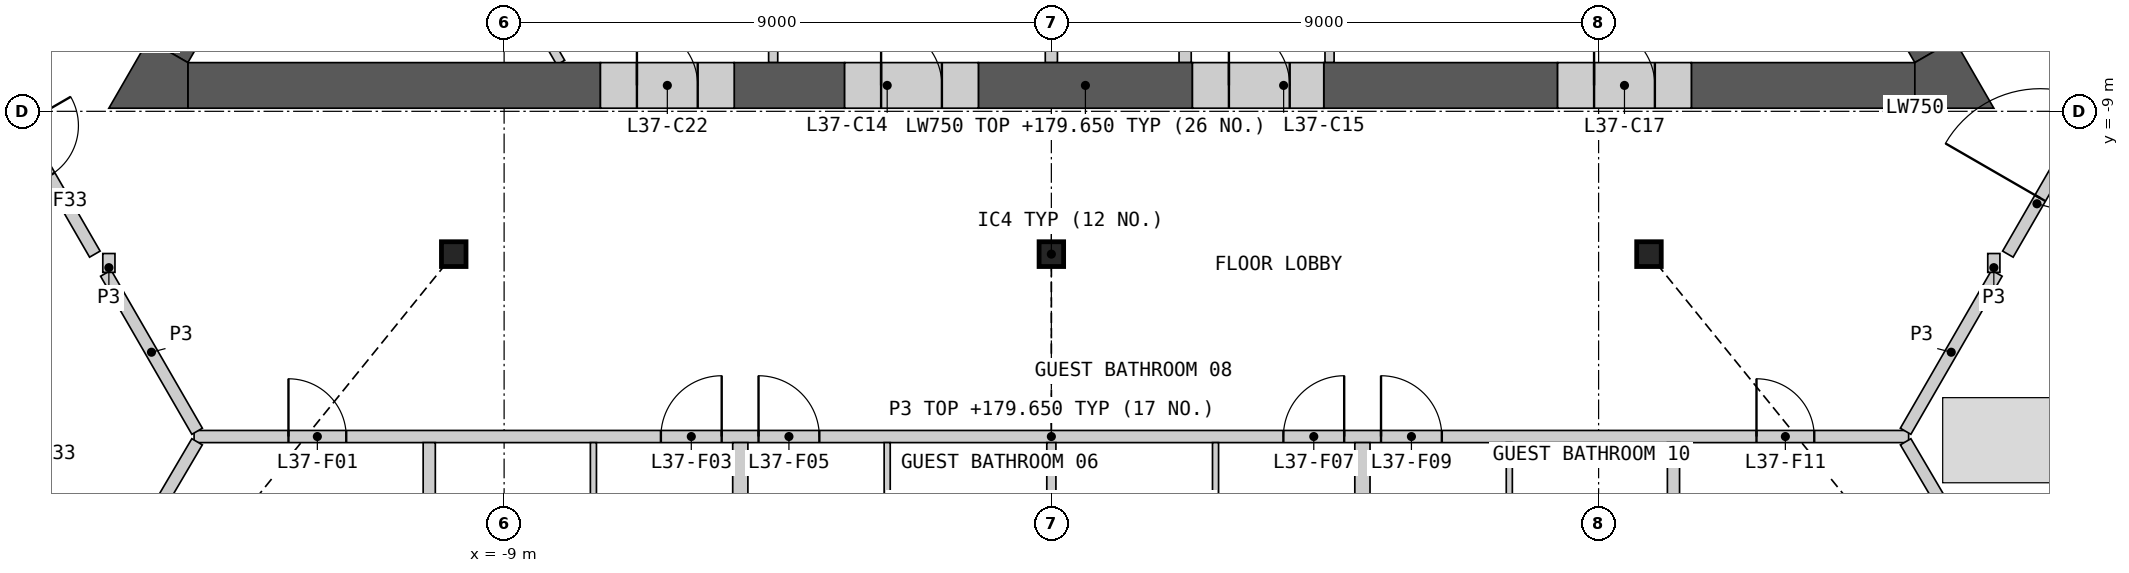
"""IFC4 building model, lengths in metres.
Left out: names, types, materials, properties, quantities, classifications, styles, units other than length and angle.
Written with IfcOpenShell. Run it as: python <this file> out.ifc"""

import sys

from ifc_helpers import new_model, si_unit, direction, frame, frame_2d, origin, origin_2d, place, context, subcontext, project, spatial, polyline, rectangle, i_section, outline, extrude, element, fill, save


model = new_model("IFC4")
c1 = context("Model", 3, precision=1e-05, world=origin(), true_north=direction((0.0, 1.0)))
c2 = subcontext(c1, "Body", "Model", "MODEL_VIEW")
j1 = project(units=[si_unit("LENGTHUNIT", "METRE"), si_unit("PLANEANGLEUNIT", "RADIAN")], contexts=[c1])
p1 = place(None, origin())
s1 = spatial("IfcSite", under=j1, at=p1, CompositionType="ELEMENT")
p2 = place(p1, origin())
s2 = spatial("IfcBuilding", under=s1, at=p2, CompositionType="ELEMENT")
p3 = place(p2, frame((0.0, 0.0, 176.4)))
s3 = spatial("IfcBuildingStorey", under=s2, at=p3, CompositionType="ELEMENT", Elevation=176.4)
for number, where, z_axis, x_axis in (
    (1, (-9.828, -11.349, 0.0), (0.0, 0.0, 1.0), (1.0, 0.0, 0.0)),
    (2, (0.0, -11.349, 0.0), (0.0, 0.0, 1.0), (1.0, 0.0, 0.0)),
    (3, (9.828, -11.349, 0.0), (0.0, 0.0, 1.0), (1.0, 0.0, 0.0)),
):
    element("IfcColumn", number, at=place(p3, frame(where, z_axis=z_axis, x_axis=x_axis)), inside=s3, PredefinedType="COLUMN", context=c2, shape_type="SweptSolid", body=[
        extrude(i_section(OverallWidth=0.404, OverallDepth=0.407, WebThickness=0.027, FlangeThickness=0.044, at=origin_2d()), origin(), (0.0, 0.0, 1.0), 3.6),
    ])
for number, where, z_axis, x_axis in (
    (4, (0.0, -6.906, 0.0), (0.0, 0.0, 1.0), (0.0, -1.0, 0.0)),
    (5, (2.2, -6.906, 0.0), (0.0, 0.0, 1.0), (0.0, -1.0, 0.0)),
):
    element("IfcWall", number, at=place(p3, frame(where, z_axis=z_axis, x_axis=x_axis)), inside=s3, PredefinedType="SHEAR", context=c2, shape_type="SweptSolid", body=[
        extrude(rectangle(XDim=1.293, YDim=0.2, at=frame_2d((0.646, 0.0))), origin(), (0.0, 0.0, 1.0), 3.25),
    ])
for number, where, z_axis, x_axis in (
    (6, (4.575, -6.906, 0.0), (0.0, 0.0, 1.0), (0.0, -1.0, 0.0)),
    (7, (-4.575, -6.906, 0.0), (0.0, 0.0, 1.0), (0.0, -1.0, 0.0)),
):
    element("IfcWall", number, at=place(p3, frame(where, z_axis=z_axis, x_axis=x_axis)), inside=s3, PredefinedType="PARTITIONING", context=c2, shape_type="SweptSolid", body=[
        extrude(rectangle(XDim=1.293, YDim=0.15, at=frame_2d((0.646, 0.0))), origin(), (0.0, 0.0, 1.0), 3.25),
    ])
p4 = place(p3, frame((-8.83, -6.881, 0.0), z_axis=(0.0, 0.0, 1.0), x_axis=(0.500037110984, -0.866003976688, 0.0)))
e8 = element("IfcWall", 8, at=p4, inside=s3, PredefinedType="PARTITIONING", context=c2, shape_type="SweptSolid", body=[
    extrude(rectangle(XDim=1.522, YDim=0.15, at=frame_2d((0.761, 0.0))), origin(), (0.0, 0.0, 1.0), 3.25),
])
p5 = place(p3, frame((-14.201, -8.574, 0.0), z_axis=(0.0, 0.0, 1.0), x_axis=(1.0, 0.0, 0.0)))
e9 = element("IfcWall", 9, at=p5, inside=s3, PredefinedType="SHEAR", context=c2, shape_type="SweptSolid", body=[
    extrude(rectangle(XDim=6.785, YDim=0.75, at=frame_2d((3.393, 0.0))), origin(), (0.0, 0.0, 1.0), 3.25),
])
p6 = place(p3, frame((4.48, -8.574, 0.0), z_axis=(0.0, 0.0, 1.0), x_axis=(1.0, 0.0, 0.0)))
e10 = element("IfcWall", 10, at=p6, inside=s3, PredefinedType="SHEAR", context=c2, shape_type="SweptSolid", body=[
    extrude(rectangle(XDim=3.845, YDim=0.75, at=frame_2d((1.923, 0.0))), origin(), (0.0, 0.0, 1.0), 3.25),
])
p7 = place(p3, frame((10.525, -8.574, 0.0), z_axis=(0.0, 0.0, 1.0), x_axis=(1.0, 0.0, 0.0)))
e11 = element("IfcWall", 11, at=p7, inside=s3, PredefinedType="SHEAR", context=c2, shape_type="SweptSolid", body=[
    extrude(rectangle(XDim=3.676, YDim=0.75, at=frame_2d((1.838, 0.0))), origin(), (0.0, 0.0, 1.0), 3.25),
])
p8 = place(p3, frame((-1.2, -8.574, 0.0), z_axis=(0.0, 0.0, 1.0), x_axis=(1.0, 0.0, 0.0)))
e12 = element("IfcWall", 12, at=p8, inside=s3, PredefinedType="SHEAR", context=c2, shape_type="SweptSolid", body=[
    extrude(rectangle(XDim=3.52, YDim=0.75, at=frame_2d((1.76, 0.0))), origin(), (0.0, 0.0, 1.0), 3.25),
])
p9 = place(p3, frame((-5.216, -8.574, 0.0), z_axis=(0.0, 0.0, 1.0), x_axis=(1.0, 0.0, 0.0)))
e13 = element("IfcWall", 13, at=p9, inside=s3, PredefinedType="SHEAR", context=c2, shape_type="SweptSolid", body=[
    extrude(rectangle(XDim=1.816, YDim=0.75, at=frame_2d((0.908, 0.0))), origin(), (0.0, 0.0, 1.0), 3.25),
])
p10 = place(p3, frame((14.526, -8.011, 0.0), z_axis=(0.0, 0.0, 1.0), x_axis=(-0.499994855372, 0.866028374016, 0.0)))
e14 = element("IfcWall", 14, at=p10, inside=s3, PredefinedType="SHEAR", context=c2, shape_type="SweptSolid", body=[
    extrude(rectangle(XDim=14.301, YDim=0.75, at=frame_2d((7.15, 0.0))), origin(), (0.0, 0.0, 1.0), 3.25),
])
p11 = place(p3, frame((-13.564, -6.346, 0.0), z_axis=(0.0, 0.0, 1.0), x_axis=(-0.499989888488, -0.86603124159, 0.0)))
e15 = element("IfcWall", 15, at=p11, inside=s3, PredefinedType="SHEAR", context=c2, shape_type="SweptSolid", body=[
    extrude(rectangle(XDim=1.923, YDim=0.75, at=frame_2d((0.961, 0.0))), origin(), (0.0, 0.0, 1.0), 3.25),
])
p12 = place(p3, origin())
e16 = element("IfcWall", 16, at=p12, inside=s3, PredefinedType="SHEAR", context=c2, shape_type="SweptSolid", body=[
    extrude(outline(polyline([(14.201, -8.949), (14.201, -8.199), (14.851, -7.824), (15.5, -8.949), (14.201, -8.949)])), origin(), (0.0, 0.0, 1.0), 3.25),
])
p13 = place(p3, origin())
e17 = element("IfcWall", 17, at=p13, inside=s3, PredefinedType="SHEAR", context=c2, shape_type="SweptSolid", body=[
    extrude(outline(polyline([(-14.851, -7.824), (-14.201, -8.199), (-14.201, -8.949), (-15.5, -8.949), (-14.851, -7.824)])), origin(), (0.0, 0.0, 1.0), 3.25),
])
p14 = place(p3, frame((-3.4, -8.574, 0.0), z_axis=(0.0, 0.0, 1.0), x_axis=(1.0, 0.0, 0.0)))
e18 = element("IfcWall", 18, at=p14, inside=s3, PredefinedType="SHEAR", context=c2, shape_type="SweptSolid", body=[
    extrude(rectangle(XDim=2.2, YDim=0.75, at=frame_2d((1.1, 0.0))), origin(), (0.0, 0.0, 1.0), 3.25),
])
p15 = place(p14, frame((0.6, 0.0, 0.0)))
e19 = element("IfcOpeningElement", 19, at=p15, cuts=e18, PredefinedType="OPENING", context=c2, shape_type="SweptSolid", body=[
    extrude(rectangle(XDim=1.0, YDim=2.1, at=frame_2d((0.5, 1.05))), frame((0.0, 0.385, 0.0), z_axis=(0.0, -1.0, 0.0), x_axis=(1.0, 0.0, 0.0)), (0.0, 0.0, 1.0), 0.77),
])
p16 = place(p3, frame((2.32, -8.574, 0.0), z_axis=(0.0, 0.0, 1.0), x_axis=(1.0, 0.0, 0.0)))
e20 = element("IfcWall", 20, at=p16, inside=s3, PredefinedType="SHEAR", context=c2, shape_type="SweptSolid", body=[
    extrude(rectangle(XDim=2.16, YDim=0.75, at=frame_2d((1.08, 0.0))), origin(), (0.0, 0.0, 1.0), 3.25),
])
p17 = place(p16, frame((0.6, 0.0, 0.0)))
e21 = element("IfcOpeningElement", 21, at=p17, cuts=e20, PredefinedType="OPENING", context=c2, shape_type="SweptSolid", body=[
    extrude(rectangle(XDim=1.0, YDim=2.1, at=frame_2d((0.5, 1.05))), frame((0.0, 0.385, 0.0), z_axis=(0.0, -1.0, 0.0), x_axis=(1.0, 0.0, 0.0)), (0.0, 0.0, 1.0), 0.77),
])
p18 = place(p3, frame((8.325, -8.574, 0.0), z_axis=(0.0, 0.0, 1.0), x_axis=(1.0, 0.0, 0.0)))
e22 = element("IfcWall", 22, at=p18, inside=s3, PredefinedType="SHEAR", context=c2, shape_type="SweptSolid", body=[
    extrude(rectangle(XDim=2.2, YDim=0.75, at=frame_2d((1.1, 0.0))), origin(), (0.0, 0.0, 1.0), 3.25),
])
p19 = place(p18, frame((0.6, 0.0, 0.0)))
e23 = element("IfcOpeningElement", 23, at=p19, cuts=e22, PredefinedType="OPENING", context=c2, shape_type="SweptSolid", body=[
    extrude(rectangle(XDim=1.0, YDim=2.1, at=frame_2d((0.5, 1.05))), frame((0.0, 0.385, 0.0), z_axis=(0.0, -1.0, 0.0), x_axis=(1.0, 0.0, 0.0)), (0.0, 0.0, 1.0), 0.77),
])
p20 = place(p3, frame((-7.416, -8.574, 0.0), z_axis=(0.0, 0.0, 1.0), x_axis=(1.0, 0.0, 0.0)))
e24 = element("IfcWall", 24, at=p20, inside=s3, PredefinedType="SHEAR", context=c2, shape_type="SweptSolid", body=[
    extrude(rectangle(XDim=2.2, YDim=0.75, at=frame_2d((1.1, 0.0))), origin(), (0.0, 0.0, 1.0), 3.25),
])
p21 = place(p20, frame((0.6, 0.0, 0.0)))
e25 = element("IfcOpeningElement", 25, at=p21, cuts=e24, PredefinedType="OPENING", context=c2, shape_type="SweptSolid", body=[
    extrude(rectangle(XDim=1.0, YDim=2.1, at=frame_2d((0.5, 1.05))), frame((0.0, 0.385, 0.0), z_axis=(0.0, -1.0, 0.0), x_axis=(1.0, 0.0, 0.0)), (0.0, 0.0, 1.0), 0.77),
])
p22 = place(p3, frame((-14.099, -14.349, 0.0), z_axis=(0.0, 0.0, 1.0), x_axis=(1.0, 0.0, 0.0)))
e26 = element("IfcWall", 26, at=p22, inside=s3, PredefinedType="PARTITIONING", context=c2, shape_type="SweptSolid", body=[
    extrude(rectangle(XDim=28.198, YDim=0.2, at=frame_2d((14.099, 0.0))), origin(), (0.0, 0.0, 1.0), 3.25),
])
p23 = place(p22, frame((1.552, 0.0, 0.0)))
e27 = element("IfcOpeningElement", 27, at=p23, cuts=e26, PredefinedType="OPENING", context=c2, shape_type="SweptSolid", body=[
    extrude(rectangle(XDim=0.95, YDim=2.1, at=frame_2d((0.475, 1.05))), frame((0.0, 0.11, 0.0), z_axis=(0.0, -1.0, 0.0), x_axis=(1.0, 0.0, 0.0)), (0.0, 0.0, 1.0), 0.22),
])
p24 = place(p22, frame((7.677, 0.0, 0.0)))
e28 = element("IfcOpeningElement", 28, at=p24, cuts=e26, PredefinedType="OPENING", context=c2, shape_type="SweptSolid", body=[
    extrude(rectangle(XDim=1.0, YDim=2.1, at=frame_2d((0.5, 1.05))), frame((0.0, 0.11, 0.0), z_axis=(0.0, -1.0, 0.0), x_axis=(1.0, 0.0, 0.0)), (0.0, 0.0, 1.0), 0.22),
])
p25 = place(p22, frame((9.283, 0.0, 0.0)))
e29 = element("IfcOpeningElement", 29, at=p25, cuts=e26, PredefinedType="OPENING", context=c2, shape_type="SweptSolid", body=[
    extrude(rectangle(XDim=1.0, YDim=2.1, at=frame_2d((0.5, 1.05))), frame((0.0, 0.11, 0.0), z_axis=(0.0, -1.0, 0.0), x_axis=(1.0, 0.0, 0.0)), (0.0, 0.0, 1.0), 0.22),
])
p26 = place(p22, frame((17.915, 0.0, 0.0)))
e30 = element("IfcOpeningElement", 30, at=p26, cuts=e26, PredefinedType="OPENING", context=c2, shape_type="SweptSolid", body=[
    extrude(rectangle(XDim=1.0, YDim=2.1, at=frame_2d((0.5, 1.05))), frame((0.0, 0.11, 0.0), z_axis=(0.0, -1.0, 0.0), x_axis=(1.0, 0.0, 0.0)), (0.0, 0.0, 1.0), 0.22),
])
p27 = place(p22, frame((19.521, 0.0, 0.0)))
e31 = element("IfcOpeningElement", 31, at=p27, cuts=e26, PredefinedType="OPENING", context=c2, shape_type="SweptSolid", body=[
    extrude(rectangle(XDim=1.0, YDim=2.1, at=frame_2d((0.5, 1.05))), frame((0.0, 0.11, 0.0), z_axis=(0.0, -1.0, 0.0), x_axis=(1.0, 0.0, 0.0)), (0.0, 0.0, 1.0), 0.22),
])
p28 = place(p22, frame((25.696, 0.0, 0.0)))
e32 = element("IfcOpeningElement", 32, at=p28, cuts=e26, PredefinedType="OPENING", context=c2, shape_type="SweptSolid", body=[
    extrude(rectangle(XDim=0.95, YDim=2.1, at=frame_2d((0.475, 1.05))), frame((0.0, 0.11, 0.0), z_axis=(0.0, -1.0, 0.0), x_axis=(1.0, 0.0, 0.0)), (0.0, 0.0, 1.0), 0.22),
])
p29 = place(p3, frame((-17.744, -8.035, 0.0), z_axis=(0.0, 0.0, 1.0), x_axis=(0.500007607708, 0.866021011428, 0.0)))
e33 = element("IfcWall", 33, at=p29, inside=s3, PredefinedType="PARTITIONING", context=c2, shape_type="SweptSolid", body=[
    extrude(rectangle(XDim=5.484, YDim=0.2, at=frame_2d((2.742, 0.0))), origin(), (0.0, 0.0, 1.0), 3.25),
])
p30 = place(p29, frame((0.352, 0.0, 0.0)))
e34 = element("IfcOpeningElement", 34, at=p30, cuts=e33, PredefinedType="OPENING", context=c2, shape_type="SweptSolid", body=[
    extrude(rectangle(XDim=1.1, YDim=2.1, at=frame_2d((0.55, 1.05))), frame((0.0, 0.11, 0.0), z_axis=(0.0, -1.0, 0.0), x_axis=(1.0, 0.0, 0.0)), (0.0, 0.0, 1.0), 0.22),
])
p31 = place(p3, frame((15.002, -3.286, 0.0), z_axis=(0.0, 0.0, 1.0), x_axis=(0.500007607708, -0.866021011428, 0.0)))
e35 = element("IfcWall", 35, at=p31, inside=s3, PredefinedType="PARTITIONING", context=c2, shape_type="SweptSolid", body=[
    extrude(rectangle(XDim=5.484, YDim=0.2, at=frame_2d((2.742, 0.0))), origin(), (0.0, 0.0, 1.0), 3.25),
])
p32 = place(p31, frame((4.032, 0.0, 0.0)))
e36 = element("IfcOpeningElement", 36, at=p32, cuts=e35, PredefinedType="OPENING", context=c2, shape_type="SweptSolid", body=[
    extrude(rectangle(XDim=1.1, YDim=2.1, at=frame_2d((0.55, 1.05))), frame((0.0, 0.11, 0.0), z_axis=(0.0, -1.0, 0.0), x_axis=(1.0, 0.0, 0.0)), (0.0, 0.0, 1.0), 0.22),
])
for number, where, z_axis, x_axis in (
    (37, (-5.116, -19.661, 0.0), (0.0, 0.0, 1.0), (0.0, 1.0, 0.0)),
    (38, (5.116, -19.661, 0.0), (0.0, 0.0, 1.0), (0.0, 1.0, 0.0)),
):
    element("IfcWall", number, at=place(p3, frame(where, z_axis=z_axis, x_axis=x_axis)), inside=s3, PredefinedType="PARTITIONING", context=c2, shape_type="SweptSolid", body=[
        extrude(rectangle(XDim=5.212, YDim=0.25, at=frame_2d((2.606, 0.0))), origin(), (0.0, 0.0, 1.0), 2.404),
    ])
p33 = place(p3, frame((15.731, -11.349, 0.0), z_axis=(0.0, 0.0, 1.0), x_axis=(0.499961815444, 0.866047448526, 0.0)))
e39 = element("IfcWall", 39, at=p33, inside=s3, PredefinedType="PARTITIONING", context=c2, shape_type="SweptSolid", body=[
    extrude(rectangle(XDim=3.826, YDim=0.2, at=frame_2d((1.913, 0.0))), origin(), (0.0, 0.0, 1.0), 3.25),
])
p34 = place(p33, frame((1.064, 0.0, 0.0)))
e40 = element("IfcOpeningElement", 40, at=p34, cuts=e39, PredefinedType="OPENING", context=c2, shape_type="SweptSolid", body=[
    extrude(rectangle(XDim=1.8, YDim=2.1, at=frame_2d((0.9, 1.05))), frame((0.0, 0.11, 0.0), z_axis=(0.0, -1.0, 0.0), x_axis=(1.0, 0.0, 0.0)), (0.0, 0.0, 1.0), 0.22),
])
p35 = place(p3, frame((-17.644, -8.035, 0.0), z_axis=(0.0, 0.0, 1.0), x_axis=(0.499961815444, -0.866047448526, 0.0)))
e41 = element("IfcWall", 41, at=p35, inside=s3, PredefinedType="PARTITIONING", context=c2, shape_type="SweptSolid", body=[
    extrude(rectangle(XDim=3.826, YDim=0.2, at=frame_2d((1.913, 0.0))), origin(), (0.0, 0.0, 1.0), 3.25),
])
p36 = place(p35, frame((1.386, 0.0, 0.0)))
e42 = element("IfcOpeningElement", 42, at=p36, cuts=e41, PredefinedType="OPENING", context=c2, shape_type="SweptSolid", body=[
    extrude(rectangle(XDim=0.95, YDim=2.1, at=frame_2d((0.475, 1.05))), frame((0.0, 0.11, 0.0), z_axis=(0.0, -1.0, 0.0), x_axis=(1.0, 0.0, 0.0)), (0.0, 0.0, 1.0), 0.22),
])
for number, where, z_axis, x_axis in (
    (43, (14.049, -14.262, 0.0), (0.0, 0.0, 1.0), (0.5, 0.866, 0.0)),
    (44, (-15.55, -11.662, 0.0), (0.0, 0.0, 1.0), (0.5, -0.866, 0.0)),
):
    element("IfcWall", number, at=place(p3, frame(where, z_axis=z_axis, x_axis=x_axis)), inside=s3, PredefinedType="PARTITIONING", context=c2, shape_type="SweptSolid", body=[
        extrude(rectangle(XDim=3.002, YDim=0.2, at=frame_2d((1.501, 0.0))), origin(), (0.0, 0.0, 1.0), 3.25),
    ])
for number, where, z_axis, x_axis in (
    (45, (15.5, -11.649, 0.0), (0.0, 0.0, 1.0), (0.0, 1.0, 0.0)),
    (46, (-15.5, -11.649, 0.0), (0.0, 0.0, 1.0), (0.0, 1.0, 0.0)),
):
    element("IfcWall", number, at=place(p3, frame(where, z_axis=z_axis, x_axis=x_axis)), inside=s3, PredefinedType="PARTITIONING", context=c2, shape_type="SweptSolid", body=[
        extrude(rectangle(XDim=0.31, YDim=0.2, at=frame_2d((0.155, 0.0))), origin(), (0.0, 0.0, 1.0), 3.25),
    ])
p37 = place(p3, frame((14.05, -14.435, 0.0), z_axis=(0.0, 0.0, 1.0), x_axis=(0.50691019554, -0.861998871031, 0.0)))
e47 = element("IfcWall", 47, at=p37, inside=s3, PredefinedType="PARTITIONING", context=c2, shape_type="SweptSolid", body=[
    extrude(rectangle(XDim=12.229, YDim=0.2, at=frame_2d((6.115, 0.0))), origin(), (0.0, 0.0, 1.0), 2.404),
])
p38 = place(p3, frame((-20.046, -24.632, 0.0), z_axis=(0.0, 0.0, 1.0), x_axis=(0.50691549935, 0.86199575203, 0.0)))
e48 = element("IfcWall", 48, at=p38, inside=s3, PredefinedType="PARTITIONING", context=c2, shape_type="SweptSolid", body=[
    extrude(rectangle(XDim=11.83, YDim=0.2, at=frame_2d((5.915, 0.0))), origin(), (0.0, 0.0, 1.0), 2.404),
])
p39 = place(p3, frame((-22.363, -7.862, 0.0), z_axis=(0.0, 0.0, 1.0), x_axis=(0.500009728207, -0.866019787128, 0.0)))
e49 = element("IfcWall", 49, at=p39, inside=s3, PredefinedType="PARTITIONING", context=c2, shape_type="SweptSolid", body=[
    extrude(rectangle(XDim=11.967, YDim=0.2, at=frame_2d((5.983, 0.0))), origin(), (0.0, 0.0, 1.0), 2.404),
])
p40 = place(p39, frame((5.658, 0.0, 0.0)))
e50 = element("IfcOpeningElement", 50, at=p40, cuts=e49, PredefinedType="OPENING", context=c2, shape_type="SweptSolid", body=[
    extrude(rectangle(XDim=0.95, YDim=2.1, at=frame_2d((0.475, 1.05))), frame((0.0, 0.11, 0.0), z_axis=(0.0, -1.0, 0.0), x_axis=(1.0, 0.0, 0.0)), (0.0, 0.0, 1.0), 0.22),
])
for number, where, z_axis, x_axis in (
    (51, (-10.231, -24.312, 0.0), (0.0, 0.0, 1.0), (0.0, 1.0, 0.0)),
    (52, (10.231, -24.312, 0.0), (0.0, 0.0, 1.0), (0.0, 1.0, 0.0)),
):
    element("IfcWall", number, at=place(p3, frame(where, z_axis=z_axis, x_axis=x_axis)), inside=s3, PredefinedType="PARTITIONING", context=c2, shape_type="SweptSolid", body=[
        extrude(rectangle(XDim=9.863, YDim=0.2, at=frame_2d((4.931, 0.0))), origin(), (0.0, 0.0, 1.0), 2.404),
    ])
p41 = place(p3, frame((0.0, -16.899, 0.0), z_axis=(0.0, 0.0, 1.0), x_axis=(0.0, 1.0, 0.0)))
e53 = element("IfcWall", 53, at=p41, inside=s3, PredefinedType="PLUMBINGWALL", context=c2, shape_type="SweptSolid", body=[
    extrude(rectangle(XDim=2.45, YDim=0.15, at=frame_2d((1.225, 0.0))), origin(), (0.0, 0.0, 1.0), 2.404),
])
for number, where, z_axis, x_axis in (
    (54, (-7.531, -16.899, 0.0), (0.0, 0.0, 1.0), (0.0, 1.0, 0.0)),
    (55, (-2.7, -16.899, 0.0), (0.0, 0.0, 1.0), (0.0, 1.0, 0.0)),
    (56, (2.7, -16.899, 0.0), (0.0, 0.0, 1.0), (0.0, 1.0, 0.0)),
    (57, (7.531, -16.899, 0.0), (0.0, 0.0, 1.0), (0.0, 1.0, 0.0)),
):
    element("IfcWall", number, at=place(p3, frame(where, z_axis=z_axis, x_axis=x_axis)), inside=s3, PredefinedType="PARTITIONING", context=c2, shape_type="SweptSolid", body=[
        extrude(rectangle(XDim=2.45, YDim=0.1, at=frame_2d((1.225, 0.0))), origin(), (0.0, 0.0, 1.0), 2.404),
    ])
p42 = place(p15, origin())
e58 = element("IfcDoor", 58, at=p42, inside=s3, OperationType="SINGLE_SWING_LEFT", PredefinedType="DOOR", context=c2, shape_type="SweptSolid", body=[
    extrude(rectangle(XDim=1.0, YDim=2.1, at=frame_2d((0.5, 1.05))), frame((0.0, 0.13, 0.0), z_axis=(0.0, -1.0, 0.0), x_axis=(1.0, 0.0, 0.0)), (0.0, 0.0, 1.0), 0.05),
])
fill(e19, e58)
p43 = place(p17, origin())
e59 = element("IfcDoor", 59, at=p43, inside=s3, OperationType="SINGLE_SWING_LEFT", PredefinedType="DOOR", context=c2, shape_type="SweptSolid", body=[
    extrude(rectangle(XDim=1.0, YDim=2.1, at=frame_2d((0.5, 1.05))), frame((0.0, 0.13, 0.0), z_axis=(0.0, -1.0, 0.0), x_axis=(1.0, 0.0, 0.0)), (0.0, 0.0, 1.0), 0.05),
])
fill(e21, e59)
p44 = place(p19, origin())
e60 = element("IfcDoor", 60, at=p44, inside=s3, OperationType="SINGLE_SWING_LEFT", PredefinedType="DOOR", context=c2, shape_type="SweptSolid", body=[
    extrude(rectangle(XDim=1.0, YDim=2.1, at=frame_2d((0.5, 1.05))), frame((0.0, 0.13, 0.0), z_axis=(0.0, -1.0, 0.0), x_axis=(1.0, 0.0, 0.0)), (0.0, 0.0, 1.0), 0.05),
])
fill(e23, e60)
p45 = place(p21, origin())
e61 = element("IfcDoor", 61, at=p45, inside=s3, OperationType="SINGLE_SWING_LEFT", PredefinedType="DOOR", context=c2, shape_type="SweptSolid", body=[
    extrude(rectangle(XDim=1.0, YDim=2.1, at=frame_2d((0.5, 1.05))), frame((0.0, 0.13, 0.0), z_axis=(0.0, -1.0, 0.0), x_axis=(1.0, 0.0, 0.0)), (0.0, 0.0, 1.0), 0.05),
])
fill(e25, e61)
p46 = place(p23, origin())
e62 = element("IfcDoor", 62, at=p46, inside=s3, OperationType="SINGLE_SWING_LEFT", PredefinedType="DOOR", context=c2, shape_type="SweptSolid", body=[
    extrude(rectangle(XDim=0.95, YDim=2.1, at=frame_2d((0.475, 1.05))), frame((0.0, 0.025, 0.0), z_axis=(0.0, -1.0, 0.0), x_axis=(1.0, 0.0, 0.0)), (0.0, 0.0, 1.0), 0.05),
])
fill(e27, e62)
p47 = place(p24, origin())
e63 = element("IfcDoor", 63, at=p47, inside=s3, OperationType="SINGLE_SWING_RIGHT", PredefinedType="DOOR", context=c2, shape_type="SweptSolid", body=[
    extrude(rectangle(XDim=1.0, YDim=2.1, at=frame_2d((0.5, 1.05))), frame((0.0, 0.025, 0.0), z_axis=(0.0, -1.0, 0.0), x_axis=(1.0, 0.0, 0.0)), (0.0, 0.0, 1.0), 0.05),
])
fill(e28, e63)
p48 = place(p25, origin())
e64 = element("IfcDoor", 64, at=p48, inside=s3, OperationType="SINGLE_SWING_LEFT", PredefinedType="DOOR", context=c2, shape_type="SweptSolid", body=[
    extrude(rectangle(XDim=1.0, YDim=2.1, at=frame_2d((0.5, 1.05))), frame((0.0, 0.025, 0.0), z_axis=(0.0, -1.0, 0.0), x_axis=(1.0, 0.0, 0.0)), (0.0, 0.0, 1.0), 0.05),
])
fill(e29, e64)
p49 = place(p26, origin())
e65 = element("IfcDoor", 65, at=p49, inside=s3, OperationType="SINGLE_SWING_RIGHT", PredefinedType="DOOR", context=c2, shape_type="SweptSolid", body=[
    extrude(rectangle(XDim=1.0, YDim=2.1, at=frame_2d((0.5, 1.05))), frame((0.0, 0.025, 0.0), z_axis=(0.0, -1.0, 0.0), x_axis=(1.0, 0.0, 0.0)), (0.0, 0.0, 1.0), 0.05),
])
fill(e30, e65)
p50 = place(p27, origin())
e66 = element("IfcDoor", 66, at=p50, inside=s3, OperationType="SINGLE_SWING_LEFT", PredefinedType="DOOR", context=c2, shape_type="SweptSolid", body=[
    extrude(rectangle(XDim=1.0, YDim=2.1, at=frame_2d((0.5, 1.05))), frame((0.0, 0.025, 0.0), z_axis=(0.0, -1.0, 0.0), x_axis=(1.0, 0.0, 0.0)), (0.0, 0.0, 1.0), 0.05),
])
fill(e31, e66)
p51 = place(p28, origin())
e67 = element("IfcDoor", 67, at=p51, inside=s3, OperationType="SINGLE_SWING_LEFT", PredefinedType="DOOR", context=c2, shape_type="SweptSolid", body=[
    extrude(rectangle(XDim=0.95, YDim=2.1, at=frame_2d((0.475, 1.05))), frame((0.0, 0.025, 0.0), z_axis=(0.0, -1.0, 0.0), x_axis=(1.0, 0.0, 0.0)), (0.0, 0.0, 1.0), 0.05),
])
fill(e32, e67)
p52 = place(p34, origin())
e68 = element("IfcDoor", 68, at=p52, inside=s3, OperationType="DOUBLE_DOOR_SINGLE_SWING", PredefinedType="DOOR", context=c2, shape_type="SweptSolid", body=[
    extrude(rectangle(XDim=1.8, YDim=2.1, at=frame_2d((0.9, 1.05))), frame((0.0, 0.025, 0.0), z_axis=(0.0, -1.0, 0.0), x_axis=(1.0, 0.0, 0.0)), (0.0, 0.0, 1.0), 0.05),
])
fill(e40, e68)
save(model, sys.argv[1])
